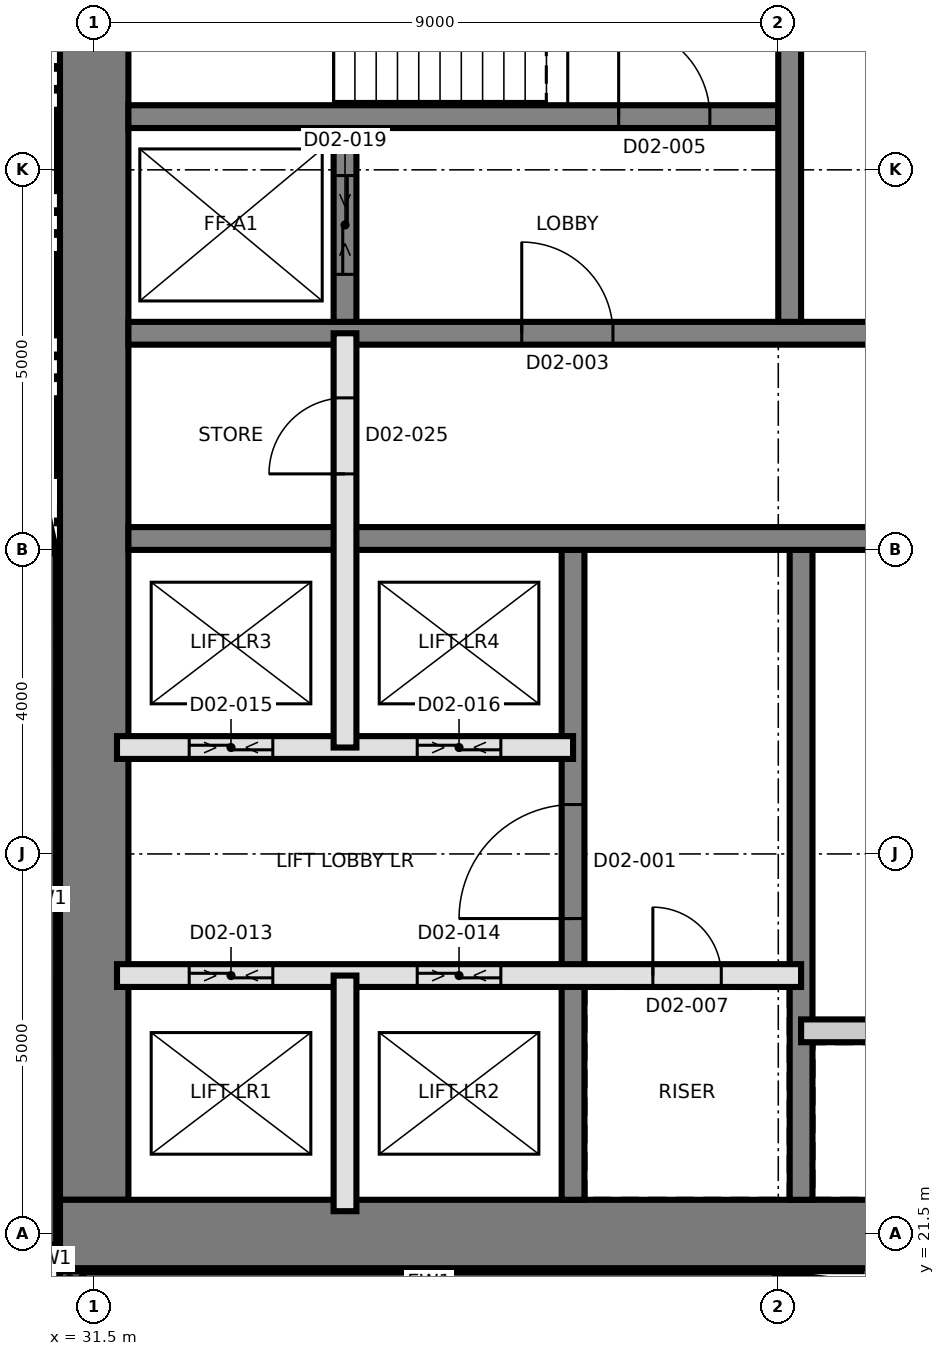
"""IFC4 building model, lengths in metres.
Left out: names, types, materials, properties, quantities, classifications, styles, units other than length and angle.
Written with IfcOpenShell. Run it as: python <this file> out.ifc"""

import sys

from ifc_helpers import new_model, si_unit, direction, frame, frame_2d, origin, place, context, subcontext, project, spatial, rectangle, extrude, element, fill, save


model = new_model("IFC4")
c1 = context("Model", 3, precision=1e-05, world=origin(), true_north=direction((0.0, 1.0)))
c2 = subcontext(c1, "Body", "Model", "MODEL_VIEW")
j1 = project(units=[si_unit("LENGTHUNIT", "METRE"), si_unit("PLANEANGLEUNIT", "RADIAN")], contexts=[c1])
p1 = place(None, origin())
s1 = spatial("IfcSite", under=j1, at=p1, CompositionType="ELEMENT")
p2 = place(p1, origin())
s2 = spatial("IfcBuilding", under=s1, at=p2, CompositionType="ELEMENT")
p3 = place(p2, frame((0.0, 0.0, 48.3)))
s3 = spatial("IfcBuildingStorey", under=s2, at=p3, CompositionType="ELEMENT", Elevation=48.3)
p4 = place(p3, frame((31.5, 21.95, 0.0), z_axis=(0.0, 0.0, 1.0), x_axis=(0.0, 1.0, 0.0)))
e1 = element("IfcWall", 1, at=p4, inside=s3, PredefinedType="SHEAR", context=c2, shape_type="SweptSolid", body=[
    extrude(rectangle(XDim=17.1, YDim=0.9, at=frame_2d((8.55, 0.0))), origin(), (0.0, 0.0, 1.0), 3.7),
])
p5 = place(p3, frame((31.05, 21.5, 0.0), z_axis=(0.0, 0.0, 1.0), x_axis=(1.0, 0.0, 0.0)))
e2 = element("IfcWall", 2, at=p5, inside=s3, PredefinedType="SHEAR", context=c2, shape_type="SweptSolid", body=[
    extrude(rectangle(XDim=27.0, YDim=0.9, at=frame_2d((13.5, 0.0))), origin(), (0.0, 0.0, 1.0), 3.7),
])
p6 = place(p3, frame((37.8, 21.95, 0.0), z_axis=(0.0, 0.0, 1.0), x_axis=(0.0, 1.0, 0.0)))
e3 = element("IfcWall", 3, at=p6, inside=s3, PredefinedType="SHEAR", context=c2, shape_type="SweptSolid", body=[
    extrude(rectangle(XDim=8.55, YDim=0.3, at=frame_2d((4.275, 0.0))), origin(), (0.0, 0.0, 1.0), 3.7),
])
p7 = place(p6, frame((3.7, 0.0, 0.0)))
e4 = element("IfcOpeningElement", 4, at=p7, cuts=e3, PredefinedType="OPENING", context=c2, shape_type="SweptSolid", body=[
    extrude(rectangle(XDim=1.5, YDim=2.1, at=frame_2d((0.75, 1.05))), frame((0.0, 0.16, 0.0), z_axis=(0.0, -1.0, 0.0), x_axis=(1.0, 0.0, 0.0)), (0.0, 0.0, 1.0), 0.32),
])
p8 = place(p3, frame((40.8, 21.95, 0.0), z_axis=(0.0, 0.0, 1.0), x_axis=(0.0, 1.0, 0.0)))
e5 = element("IfcWall", 5, at=p8, inside=s3, PredefinedType="SHEAR", context=c2, shape_type="SweptSolid", body=[
    extrude(rectangle(XDim=8.55, YDim=0.3, at=frame_2d((4.275, 0.0))), origin(), (0.0, 0.0, 1.0), 3.7),
])
p9 = place(p3, frame((31.95, 30.65, 0.0), z_axis=(0.0, 0.0, 1.0), x_axis=(1.0, 0.0, 0.0)))
e6 = element("IfcWall", 6, at=p9, inside=s3, PredefinedType="SHEAR", context=c2, shape_type="SweptSolid", body=[
    extrude(rectangle(XDim=26.1, YDim=0.3, at=frame_2d((13.05, 0.0))), origin(), (0.0, 0.0, 1.0), 3.7),
])
p10 = place(p9, frame((24.55, 0.0, 0.0)))
e7 = element("IfcOpeningElement", 7, at=p10, cuts=e6, PredefinedType="OPENING", context=c2, shape_type="SweptSolid", body=[
    extrude(rectangle(XDim=1.0, YDim=2.1, at=frame_2d((0.5, 1.05))), frame((0.0, 0.16, 0.0), z_axis=(0.0, -1.0, 0.0), x_axis=(1.0, 0.0, 0.0)), (0.0, 0.0, 1.0), 0.32),
])
p11 = place(p9, frame((11.35, 0.0, 0.0)))
e8 = element("IfcOpeningElement", 8, at=p11, cuts=e6, PredefinedType="OPENING", context=c2, shape_type="SweptSolid", body=[
    extrude(rectangle(XDim=1.0, YDim=2.1, at=frame_2d((0.5, 1.05))), frame((0.0, 0.16, 0.0), z_axis=(0.0, -1.0, 0.0), x_axis=(1.0, 0.0, 0.0)), (0.0, 0.0, 1.0), 0.32),
])
p12 = place(p3, frame((31.95, 33.35, 0.0), z_axis=(0.0, 0.0, 1.0), x_axis=(1.0, 0.0, 0.0)))
e9 = element("IfcWall", 9, at=p12, inside=s3, PredefinedType="SHEAR", context=c2, shape_type="SweptSolid", body=[
    extrude(rectangle(XDim=26.1, YDim=0.3, at=frame_2d((13.05, 0.0))), origin(), (0.0, 0.0, 1.0), 3.7),
])
p13 = place(p12, frame((13.7, 0.0, 0.0)))
e10 = element("IfcOpeningElement", 10, at=p13, cuts=e9, PredefinedType="OPENING", context=c2, shape_type="SweptSolid", body=[
    extrude(rectangle(XDim=1.4, YDim=2.1, at=frame_2d((0.7, 1.05))), frame((0.0, 0.16, 0.0), z_axis=(0.0, -1.0, 0.0), x_axis=(1.0, 0.0, 0.0)), (0.0, 0.0, 1.0), 0.32),
])
p14 = place(p12, frame((5.175, 0.0, 0.0)))
e11 = element("IfcOpeningElement", 11, at=p14, cuts=e9, PredefinedType="OPENING", context=c2, shape_type="SweptSolid", body=[
    extrude(rectangle(XDim=1.2, YDim=2.1, at=frame_2d((0.6, 1.05))), frame((0.0, 0.16, 0.0), z_axis=(0.0, -1.0, 0.0), x_axis=(1.0, 0.0, 0.0)), (0.0, 0.0, 1.0), 0.32),
])
p15 = place(p12, frame((19.725, 0.0, 0.0)))
e12 = element("IfcOpeningElement", 12, at=p15, cuts=e9, PredefinedType="OPENING", context=c2, shape_type="SweptSolid", body=[
    extrude(rectangle(XDim=1.2, YDim=2.1, at=frame_2d((0.6, 1.05))), frame((0.0, 0.16, 0.0), z_axis=(0.0, -1.0, 0.0), x_axis=(1.0, 0.0, 0.0)), (0.0, 0.0, 1.0), 0.32),
])
p16 = place(p3, frame((31.95, 36.2, 0.0), z_axis=(0.0, 0.0, 1.0), x_axis=(1.0, 0.0, 0.0)))
e13 = element("IfcWall", 13, at=p16, inside=s3, PredefinedType="SHEAR", context=c2, shape_type="SweptSolid", body=[
    extrude(rectangle(XDim=8.55, YDim=0.3, at=frame_2d((4.275, 0.0))), origin(), (0.0, 0.0, 1.0), 3.7),
])
p17 = place(p16, frame((6.45, 0.0, 0.0)))
e14 = element("IfcOpeningElement", 14, at=p17, cuts=e13, PredefinedType="OPENING", context=c2, shape_type="SweptSolid", body=[
    extrude(rectangle(XDim=1.2, YDim=2.1, at=frame_2d((0.6, 1.05))), frame((0.0, 0.16, 0.0), z_axis=(0.0, -1.0, 0.0), x_axis=(1.0, 0.0, 0.0)), (0.0, 0.0, 1.0), 0.32),
])
p18 = place(p3, frame((40.65, 33.5, 0.0), z_axis=(0.0, 0.0, 1.0), x_axis=(0.0, 1.0, 0.0)))
e15 = element("IfcWall", 15, at=p18, inside=s3, PredefinedType="SHEAR", context=c2, shape_type="SweptSolid", body=[
    extrude(rectangle(XDim=5.55, YDim=0.3, at=frame_2d((2.775, 0.0))), origin(), (0.0, 0.0, 1.0), 3.7),
])
p19 = place(p3, frame((34.8, 33.5, 0.0), z_axis=(0.0, 0.0, 1.0), x_axis=(0.0, 1.0, 0.0)))
e16 = element("IfcWall", 16, at=p19, inside=s3, PredefinedType="SHEAR", context=c2, shape_type="SweptSolid", body=[
    extrude(rectangle(XDim=2.55, YDim=0.3, at=frame_2d((1.275, 0.0))), origin(), (0.0, 0.0, 1.0), 3.7),
])
p20 = place(p19, frame((0.625, 0.0, 0.0)))
e17 = element("IfcOpeningElement", 17, at=p20, cuts=e16, PredefinedType="OPENING", context=c2, shape_type="SweptSolid", body=[
    extrude(rectangle(XDim=1.3, YDim=2.4, at=frame_2d((0.65, 1.2))), frame((0.0, 0.16, 0.0), z_axis=(0.0, -1.0, 0.0), x_axis=(1.0, 0.0, 0.0)), (0.0, 0.0, 1.0), 0.32),
])
p21 = place(p3, frame((30.85, 30.454, 0.0), z_axis=(0.0, 0.0, 1.0), x_axis=(0.0, -1.0, 0.0)))
e18 = element("IfcWall", 18, at=p21, inside=s3, PredefinedType="SOLIDWALL", context=c2, shape_type="SweptSolid", body=[
    extrude(rectangle(XDim=9.094, YDim=0.3, at=frame_2d((4.547, 0.0))), origin(), (0.0, 0.0, 1.0), 3.4),
])
for number, where, z_axis, x_axis in (
    (19, (30.861, 21.302, 0.0), (0.0, 0.0, 1.0), (0.383, -0.924, 0.0)),
    (20, (31.048, 20.967, 0.0), (0.0, 0.0, 1.0), (0.924, -0.383, 0.0)),
):
    element("IfcWall", number, at=place(p3, frame(where, z_axis=z_axis, x_axis=x_axis)), inside=s3, PredefinedType="SOLIDWALL", context=c2, shape_type="SweptSolid", body=[
        extrude(rectangle(XDim=0.275, YDim=0.3, at=frame_2d((0.138, 0.0))), origin(), (0.0, 0.0, 1.0), 3.4),
    ])
p22 = place(p3, frame((31.36, 20.85, 0.0), z_axis=(0.0, 0.0, 1.0), x_axis=(1.0, 0.0, 0.0)))
e21 = element("IfcWall", 21, at=p22, inside=s3, PredefinedType="SOLIDWALL", context=c2, shape_type="SweptSolid", body=[
    extrude(rectangle(XDim=9.094, YDim=0.3, at=frame_2d((4.547, 0.0))), origin(), (0.0, 0.0, 1.0), 3.4),
])
p23 = place(p3, frame((40.474, 20.849, 0.0), z_axis=(0.0, 0.0, 1.0), x_axis=(0.990778329255, -0.135492812649, 0.0)))
e22 = element("IfcWall", 22, at=p23, inside=s3, PredefinedType="SOLIDWALL", context=c2, shape_type="SweptSolid", body=[
    extrude(rectangle(XDim=3.559, YDim=0.3, at=frame_2d((1.779, 0.0))), origin(), (0.0, 0.0, 1.0), 3.4),
])
p24 = place(p23, frame((1.179, 0.0, 0.9)))
e23 = element("IfcOpeningElement", 23, at=p24, cuts=e22, PredefinedType="OPENING", context=c2, shape_type="SweptSolid", body=[
    extrude(rectangle(XDim=1.2, YDim=1.5, at=frame_2d((0.6, 0.75))), frame((0.0, 0.16, 0.0), z_axis=(0.0, -1.0, 0.0), x_axis=(1.0, 0.0, 0.0)), (0.0, 0.0, 1.0), 0.32),
])
p25 = place(p3, frame((30.506, 32.049, 0.0), z_axis=(0.0, 0.0, 1.0), x_axis=(0.212695686462, -0.977118490747, 0.0)))
e24 = element("IfcWall", 24, at=p25, inside=s3, PredefinedType="SOLIDWALL", context=c2, shape_type="SweptSolid", body=[
    extrude(rectangle(XDim=1.6, YDim=0.3, at=frame_2d((0.8, 0.0))), origin(), (0.0, 0.0, 1.0), 3.4),
])
p26 = place(p3, frame((40.8, 24.173, 0.0), z_axis=(0.0, 0.0, 1.0), x_axis=(1.0, 0.0, 0.0)))
e25 = element("IfcWall", 25, at=p26, inside=s3, PredefinedType="PARTITIONING", context=c2, shape_type="SweptSolid", body=[
    extrude(rectangle(XDim=6.0, YDim=0.3, at=frame_2d((3.0, 0.0))), origin(), (0.0, 0.0, 1.0), 3.4),
])
p27 = place(p26, frame((2.5, 0.0, 0.0)))
e26 = element("IfcOpeningElement", 26, at=p27, cuts=e25, PredefinedType="OPENING", context=c2, shape_type="SweptSolid", body=[
    extrude(rectangle(XDim=1.0, YDim=2.1, at=frame_2d((0.5, 1.05))), frame((0.0, 0.16, 0.0), z_axis=(0.0, -1.0, 0.0), x_axis=(1.0, 0.0, 0.0)), (0.0, 0.0, 1.0), 0.32),
])
p28 = place(p3, frame((31.8, 24.9, 0.0), z_axis=(0.0, 0.0, 1.0), x_axis=(1.0, 0.0, 0.0)))
e27 = element("IfcWall", 27, at=p28, inside=s3, PredefinedType="SOLIDWALL", context=c2, shape_type="SweptSolid", body=[
    extrude(rectangle(XDim=9.0, YDim=0.3, at=frame_2d((4.5, 0.0))), origin(), (0.0, 0.0, 1.0), 3.4),
])
p29 = place(p28, frame((7.05, 0.0, 0.0)))
e28 = element("IfcOpeningElement", 28, at=p29, cuts=e27, PredefinedType="OPENING", context=c2, shape_type="SweptSolid", body=[
    extrude(rectangle(XDim=0.9, YDim=2.1, at=frame_2d((0.45, 1.05))), frame((0.0, 0.16, 0.0), z_axis=(0.0, -1.0, 0.0), x_axis=(1.0, 0.0, 0.0)), (0.0, 0.0, 1.0), 0.32),
])
p30 = place(p28, frame((0.95, 0.0, 0.0)))
e29 = element("IfcOpeningElement", 29, at=p30, cuts=e27, PredefinedType="OPENING", context=c2, shape_type="SweptSolid", body=[
    extrude(rectangle(XDim=1.1, YDim=2.4, at=frame_2d((0.55, 1.2))), frame((0.0, 0.16, 0.0), z_axis=(0.0, -1.0, 0.0), x_axis=(1.0, 0.0, 0.0)), (0.0, 0.0, 1.0), 0.32),
])
p31 = place(p28, frame((3.95, 0.0, 0.0)))
e30 = element("IfcOpeningElement", 30, at=p31, cuts=e27, PredefinedType="OPENING", context=c2, shape_type="SweptSolid", body=[
    extrude(rectangle(XDim=1.1, YDim=2.4, at=frame_2d((0.55, 1.2))), frame((0.0, 0.16, 0.0), z_axis=(0.0, -1.0, 0.0), x_axis=(1.0, 0.0, 0.0)), (0.0, 0.0, 1.0), 0.32),
])
p32 = place(p3, frame((31.8, 27.9, 0.0), z_axis=(0.0, 0.0, 1.0), x_axis=(1.0, 0.0, 0.0)))
e31 = element("IfcWall", 31, at=p32, inside=s3, PredefinedType="SOLIDWALL", context=c2, shape_type="SweptSolid", body=[
    extrude(rectangle(XDim=6.0, YDim=0.3, at=frame_2d((3.0, 0.0))), origin(), (0.0, 0.0, 1.0), 3.4),
])
p33 = place(p32, frame((0.95, 0.0, 0.0)))
e32 = element("IfcOpeningElement", 32, at=p33, cuts=e31, PredefinedType="OPENING", context=c2, shape_type="SweptSolid", body=[
    extrude(rectangle(XDim=1.1, YDim=2.4, at=frame_2d((0.55, 1.2))), frame((0.0, 0.16, 0.0), z_axis=(0.0, -1.0, 0.0), x_axis=(1.0, 0.0, 0.0)), (0.0, 0.0, 1.0), 0.32),
])
p34 = place(p32, frame((3.95, 0.0, 0.0)))
e33 = element("IfcOpeningElement", 33, at=p34, cuts=e31, PredefinedType="OPENING", context=c2, shape_type="SweptSolid", body=[
    extrude(rectangle(XDim=1.1, YDim=2.4, at=frame_2d((0.55, 1.2))), frame((0.0, 0.16, 0.0), z_axis=(0.0, -1.0, 0.0), x_axis=(1.0, 0.0, 0.0)), (0.0, 0.0, 1.0), 0.32),
])
p35 = place(p3, frame((34.8, 21.8, 0.0), z_axis=(0.0, 0.0, 1.0), x_axis=(0.0, 1.0, 0.0)))
e34 = element("IfcWall", 34, at=p35, inside=s3, PredefinedType="SOLIDWALL", context=c2, shape_type="SweptSolid", body=[
    extrude(rectangle(XDim=3.1, YDim=0.3, at=frame_2d((1.55, 0.0))), origin(), (0.0, 0.0, 1.0), 3.4),
])
p36 = place(p3, frame((34.8, 27.9, 0.0), z_axis=(0.0, 0.0, 1.0), x_axis=(0.0, 1.0, 0.0)))
e35 = element("IfcWall", 35, at=p36, inside=s3, PredefinedType="SOLIDWALL", context=c2, shape_type="SweptSolid", body=[
    extrude(rectangle(XDim=5.45, YDim=0.3, at=frame_2d((2.725, 0.0))), origin(), (0.0, 0.0, 1.0), 3.4),
])
p37 = place(p36, frame((3.6, 0.0, 0.0)))
e36 = element("IfcOpeningElement", 36, at=p37, cuts=e35, PredefinedType="OPENING", context=c2, shape_type="SweptSolid", body=[
    extrude(rectangle(XDim=1.0, YDim=2.1, at=frame_2d((0.5, 1.05))), frame((0.0, 0.16, 0.0), z_axis=(0.0, -1.0, 0.0), x_axis=(1.0, 0.0, 0.0)), (0.0, 0.0, 1.0), 0.32),
])
p38 = place(p7, origin())
e37 = element("IfcDoor", 37, at=p38, inside=s3, OperationType="SINGLE_SWING_LEFT", PredefinedType="DOOR", context=c2, shape_type="SweptSolid", body=[
    extrude(rectangle(XDim=1.5, YDim=2.1, at=frame_2d((0.75, 1.05))), frame((0.0, 0.025, 0.0), z_axis=(0.0, -1.0, 0.0), x_axis=(1.0, 0.0, 0.0)), (0.0, 0.0, 1.0), 0.05),
])
fill(e4, e37)
p39 = place(p14, origin())
e38 = element("IfcDoor", 38, at=p39, inside=s3, OperationType="SINGLE_SWING_LEFT", PredefinedType="DOOR", context=c2, shape_type="SweptSolid", body=[
    extrude(rectangle(XDim=1.2, YDim=2.1, at=frame_2d((0.6, 1.05))), frame((0.0, 0.025, 0.0), z_axis=(0.0, -1.0, 0.0), x_axis=(1.0, 0.0, 0.0)), (0.0, 0.0, 1.0), 0.05),
])
fill(e11, e38)
p40 = place(p17, origin())
e39 = element("IfcDoor", 39, at=p40, inside=s3, OperationType="SINGLE_SWING_RIGHT", PredefinedType="DOOR", context=c2, shape_type="SweptSolid", body=[
    extrude(rectangle(XDim=1.2, YDim=2.1, at=frame_2d((0.6, 1.05))), frame((0.0, 0.025, 0.0), z_axis=(0.0, -1.0, 0.0), x_axis=(1.0, 0.0, 0.0)), (0.0, 0.0, 1.0), 0.05),
])
fill(e14, e39)
p41 = place(p29, origin())
e40 = element("IfcDoor", 40, at=p41, inside=s3, OperationType="SINGLE_SWING_LEFT", PredefinedType="DOOR", context=c2, shape_type="SweptSolid", body=[
    extrude(rectangle(XDim=0.9, YDim=2.1, at=frame_2d((0.45, 1.05))), frame((0.0, 0.025, 0.0), z_axis=(0.0, -1.0, 0.0), x_axis=(1.0, 0.0, 0.0)), (0.0, 0.0, 1.0), 0.05),
])
fill(e28, e40)
p42 = place(p30, origin())
e41 = element("IfcDoor", 41, at=p42, inside=s3, OperationType="SLIDING_TO_LEFT", PredefinedType="DOOR", context=c2, shape_type="SweptSolid", body=[
    extrude(rectangle(XDim=1.1, YDim=2.4, at=frame_2d((0.55, 1.2))), frame((0.0, 0.025, 0.0), z_axis=(0.0, -1.0, 0.0), x_axis=(1.0, 0.0, 0.0)), (0.0, 0.0, 1.0), 0.05),
])
fill(e29, e41)
p43 = place(p31, origin())
e42 = element("IfcDoor", 42, at=p43, inside=s3, OperationType="SLIDING_TO_LEFT", PredefinedType="DOOR", context=c2, shape_type="SweptSolid", body=[
    extrude(rectangle(XDim=1.1, YDim=2.4, at=frame_2d((0.55, 1.2))), frame((0.0, 0.025, 0.0), z_axis=(0.0, -1.0, 0.0), x_axis=(1.0, 0.0, 0.0)), (0.0, 0.0, 1.0), 0.05),
])
fill(e30, e42)
p44 = place(p33, origin())
e43 = element("IfcDoor", 43, at=p44, inside=s3, OperationType="SLIDING_TO_LEFT", PredefinedType="DOOR", context=c2, shape_type="SweptSolid", body=[
    extrude(rectangle(XDim=1.1, YDim=2.4, at=frame_2d((0.55, 1.2))), frame((0.0, 0.025, 0.0), z_axis=(0.0, -1.0, 0.0), x_axis=(1.0, 0.0, 0.0)), (0.0, 0.0, 1.0), 0.05),
])
fill(e32, e43)
p45 = place(p34, origin())
e44 = element("IfcDoor", 44, at=p45, inside=s3, OperationType="SLIDING_TO_LEFT", PredefinedType="DOOR", context=c2, shape_type="SweptSolid", body=[
    extrude(rectangle(XDim=1.1, YDim=2.4, at=frame_2d((0.55, 1.2))), frame((0.0, 0.025, 0.0), z_axis=(0.0, -1.0, 0.0), x_axis=(1.0, 0.0, 0.0)), (0.0, 0.0, 1.0), 0.05),
])
fill(e33, e44)
p46 = place(p20, origin())
e45 = element("IfcDoor", 45, at=p46, inside=s3, OperationType="SLIDING_TO_LEFT", PredefinedType="DOOR", context=c2, shape_type="SweptSolid", body=[
    extrude(rectangle(XDim=1.3, YDim=2.4, at=frame_2d((0.65, 1.2))), frame((0.0, 0.025, 0.0), z_axis=(0.0, -1.0, 0.0), x_axis=(1.0, 0.0, 0.0)), (0.0, 0.0, 1.0), 0.05),
])
fill(e17, e45)
p47 = place(p37, origin())
e46 = element("IfcDoor", 46, at=p47, inside=s3, OperationType="SINGLE_SWING_LEFT", PredefinedType="DOOR", context=c2, shape_type="SweptSolid", body=[
    extrude(rectangle(XDim=1.0, YDim=2.1, at=frame_2d((0.5, 1.05))), frame((0.0, 0.025, 0.0), z_axis=(0.0, -1.0, 0.0), x_axis=(1.0, 0.0, 0.0)), (0.0, 0.0, 1.0), 0.05),
])
fill(e36, e46)
save(model, sys.argv[1])
